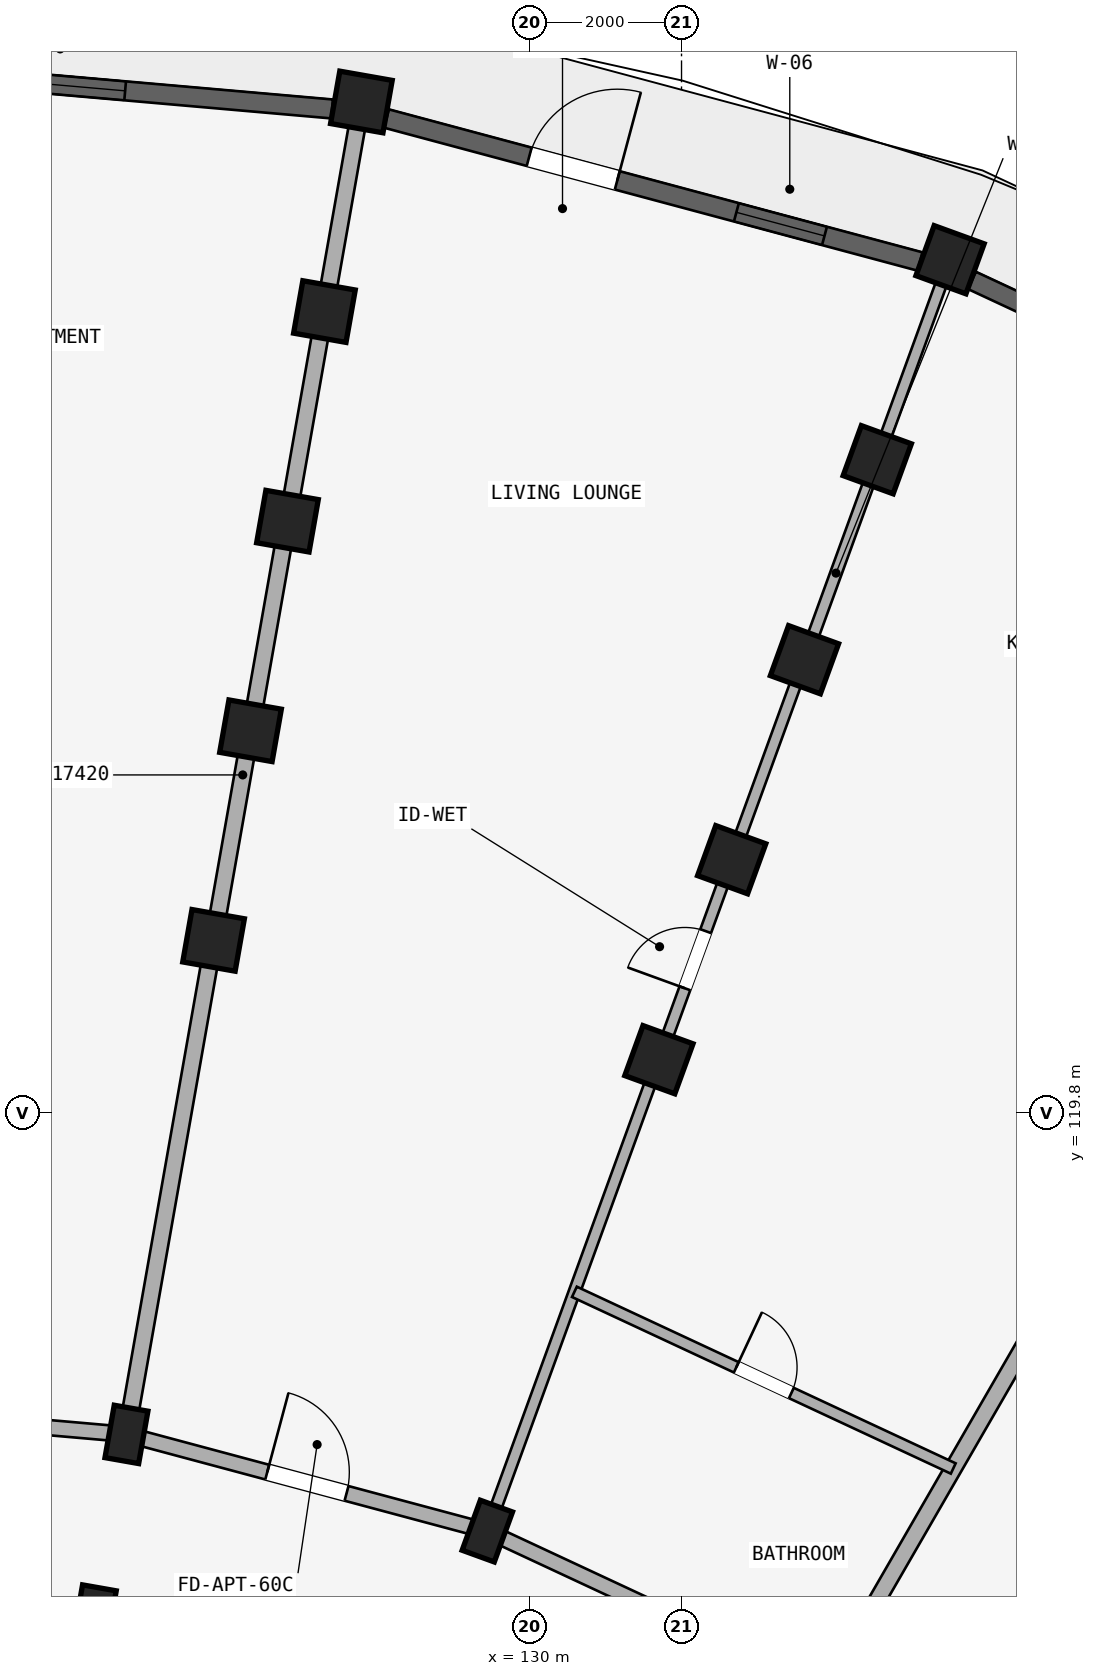
"""IFC4 building model, lengths in metres.
Left out: names, types, materials, properties, quantities, classifications, styles, units other than length and angle.
Written with IfcOpenShell. Run it as: python <this file> out.ifc"""

import sys

from ifc_helpers import new_model, si_unit, direction, frame, frame_2d, origin, origin_2d, place, context, subcontext, project, spatial, rectangle, extrude, element, fill, save


model = new_model("IFC4")
c1 = context("Model", 3, precision=1e-05, world=origin(), true_north=direction((0.0, 1.0)))
c2 = subcontext(c1, "Body", "Model", "MODEL_VIEW")
j1 = project(units=[si_unit("LENGTHUNIT", "METRE"), si_unit("PLANEANGLEUNIT", "RADIAN")], contexts=[c1])
p1 = place(None, origin())
s1 = spatial("IfcSite", under=j1, at=p1, CompositionType="ELEMENT")
p2 = place(p1, origin())
s2 = spatial("IfcBuilding", under=s1, at=p2, CompositionType="ELEMENT")
p3 = place(p2, frame((0.0, 0.0, 24.45)))
s3 = spatial("IfcBuildingStorey", under=s2, at=p3, CompositionType="ELEMENT", Elevation=24.45)
for number, where, z_axis, x_axis in (
    (1, (124.28, 113.208, 0.0), (0.0, 0.0, 1.0), (-0.985, 0.174, 0.0)),
    (2, (124.697, 115.572, 0.0), (0.0, 0.0, 1.0), (-0.985, 0.174, 0.0)),
):
    element("IfcColumn", number, at=place(p3, frame(where, z_axis=z_axis, x_axis=x_axis)), inside=s3, PredefinedType="COLUMN", context=c2, shape_type="SweptSolid", body=[
        extrude(rectangle(XDim=0.45, YDim=0.7, at=origin_2d()), origin(), (0.0, 0.0, 1.0), 2.93),
    ])
for number, where, z_axis, x_axis in (
    (3, (125.843, 122.071, 0.0), (0.0, 0.0, 1.0), (-0.985, 0.174, 0.0)),
    (4, (126.329, 124.829, 0.0), (0.0, 0.0, 1.0), (-0.985, 0.174, 0.0)),
    (5, (126.815, 127.586, 0.0), (0.0, 0.0, 1.0), (-0.985, 0.174, 0.0)),
    (6, (127.302, 130.344, 0.0), (0.0, 0.0, 1.0), (-0.985, 0.174, 0.0)),
    (7, (127.788, 133.101, 0.0), (0.0, 0.0, 1.0), (-0.985, 0.174, 0.0)),
):
    element("IfcColumn", number, at=place(p3, frame(where, z_axis=z_axis, x_axis=x_axis)), inside=s3, PredefinedType="COLUMN", context=c2, shape_type="SweptSolid", body=[
        extrude(rectangle(XDim=0.7, YDim=0.7, at=origin_2d()), origin(), (0.0, 0.0, 1.0), 2.93),
    ])
p4 = place(p3, frame((129.445, 114.299, 0.0), z_axis=(0.0, 0.0, 1.0), x_axis=(-0.939692620786, 0.342020143326, 0.0)))
e8 = element("IfcColumn", 8, at=p4, inside=s3, PredefinedType="COLUMN", context=c2, shape_type="SweptSolid", body=[
    extrude(rectangle(XDim=0.45, YDim=0.7, at=origin_2d()), origin(), (0.0, 0.0, 1.0), 2.93),
])
for number, where, z_axis, x_axis in (
    (9, (131.702, 120.501, 0.0), (0.0, 0.0, 1.0), (-0.94, 0.342, 0.0)),
    (10, (132.66, 123.132, 0.0), (0.0, 0.0, 1.0), (-0.94, 0.342, 0.0)),
    (11, (133.618, 125.764, 0.0), (0.0, 0.0, 1.0), (-0.94, 0.342, 0.0)),
    (12, (134.575, 128.395, 0.0), (0.0, 0.0, 1.0), (-0.94, 0.342, 0.0)),
    (13, (135.533, 131.026, 0.0), (0.0, 0.0, 1.0), (-0.94, 0.342, 0.0)),
):
    element("IfcColumn", number, at=place(p3, frame(where, z_axis=z_axis, x_axis=x_axis)), inside=s3, PredefinedType="COLUMN", context=c2, shape_type="SweptSolid", body=[
        extrude(rectangle(XDim=0.7, YDim=0.7, at=origin_2d()), origin(), (0.0, 0.0, 1.0), 2.93),
    ])
p5 = place(p3, frame((119.8, 113.6, 0.0), z_axis=(0.0, 0.0, 1.0), x_axis=(0.996191949488, -0.087187153726, 0.0)))
e14 = element("IfcWall", 14, at=p5, inside=s3, PredefinedType="STANDARD", context=c2, shape_type="SweptSolid", body=[
    extrude(rectangle(XDim=4.497, YDim=0.2, at=frame_2d((2.249, 0.0))), origin(), (0.0, 0.0, 1.0), 2.372),
])
p6 = place(p5, frame((1.729, 0.0, 0.0)))
e15 = element("IfcOpeningElement", 15, at=p6, cuts=e14, PredefinedType="OPENING", context=c2, shape_type="SweptSolid", body=[
    extrude(rectangle(XDim=1.04, YDim=2.15, at=frame_2d((0.52, 1.075))), frame((0.0, 0.11, 0.0), z_axis=(0.0, -1.0, 0.0), x_axis=(1.0, 0.0, 0.0)), (0.0, 0.0, 1.0), 0.22),
])
p7 = place(p3, frame((119.8, 116.0, 0.0), z_axis=(0.0, 0.0, 1.0), x_axis=(0.996193663584, -0.087167566415, 0.0)))
e16 = element("IfcWall", 16, at=p7, inside=s3, PredefinedType="STANDARD", context=c2, shape_type="SweptSolid", body=[
    extrude(rectangle(XDim=4.916, YDim=0.2, at=frame_2d((2.458, 0.0))), origin(), (0.0, 0.0, 1.0), 2.372),
])
p8 = place(p7, frame((1.938, 0.0, 0.0)))
e17 = element("IfcOpeningElement", 17, at=p8, cuts=e16, PredefinedType="OPENING", context=c2, shape_type="SweptSolid", body=[
    extrude(rectangle(XDim=1.04, YDim=2.15, at=frame_2d((0.52, 1.075))), frame((0.0, 0.11, 0.0), z_axis=(0.0, -1.0, 0.0), x_axis=(1.0, 0.0, 0.0)), (0.0, 0.0, 1.0), 0.22),
])
p9 = place(p3, frame((124.697, 115.572, 0.0), z_axis=(0.0, 0.0, 1.0), x_axis=(0.965930095386, -0.258803112091, 0.0)))
e18 = element("IfcWall", 18, at=p9, inside=s3, PredefinedType="STANDARD", context=c2, shape_type="SweptSolid", body=[
    extrude(rectangle(XDim=4.916, YDim=0.2, at=frame_2d((2.458, 0.0))), origin(), (0.0, 0.0, 1.0), 2.372),
])
p10 = place(p9, frame((1.918, 0.0, 0.0)))
e19 = element("IfcOpeningElement", 19, at=p10, cuts=e18, PredefinedType="OPENING", context=c2, shape_type="SweptSolid", body=[
    extrude(rectangle(XDim=1.08, YDim=2.15, at=frame_2d((0.54, 1.075))), frame((0.0, 0.11, 0.0), z_axis=(0.0, -1.0, 0.0), x_axis=(1.0, 0.0, 0.0)), (0.0, 0.0, 1.0), 0.22),
])
p11 = place(p3, frame((129.445, 114.299, 0.0), z_axis=(0.0, 0.0, 1.0), x_axis=(0.906302381024, -0.422629854778, 0.0)))
e20 = element("IfcWall", 20, at=p11, inside=s3, PredefinedType="STANDARD", context=c2, shape_type="SweptSolid", body=[
    extrude(rectangle(XDim=4.915, YDim=0.2, at=frame_2d((2.458, 0.0))), origin(), (0.0, 0.0, 1.0), 2.372),
])
p12 = place(p3, frame((124.714, 115.67, 0.0), z_axis=(0.0, 0.0, 1.0), x_axis=(0.173646216546, 0.984808098809, 0.0)))
e21 = element("IfcWall", 21, at=p12, inside=s3, PredefinedType="STANDARD", context=c2, shape_type="SweptSolid", body=[
    extrude(rectangle(XDim=17.42, YDim=0.22, at=frame_2d((8.71, 0.0))), origin(), (0.0, 0.0, 1.0), 2.372),
])
p13 = place(p3, frame((129.479, 114.393, 0.0), z_axis=(0.0, 0.0, 1.0), x_axis=(0.342022120477, 0.939691901159, 0.0)))
e22 = element("IfcWall", 22, at=p13, inside=s3, PredefinedType="PARTITIONING", context=c2, shape_type="SweptSolid", body=[
    extrude(rectangle(XDim=17.42, YDim=0.15, at=frame_2d((8.71, 0.0))), origin(), (0.0, 0.0, 1.0), 2.372),
])
p14 = place(p13, frame((7.5, 0.0, 0.0)))
e23 = element("IfcOpeningElement", 23, at=p14, cuts=e22, PredefinedType="OPENING", context=c2, shape_type="SweptSolid", body=[
    extrude(rectangle(XDim=0.8, YDim=2.1, at=frame_2d((0.4, 1.05))), frame((0.0, 0.085, 0.0), z_axis=(0.0, -1.0, 0.0), x_axis=(1.0, 0.0, 0.0)), (0.0, 0.0, 1.0), 0.17),
])
p15 = place(p3, frame((133.95, 112.309, 0.0), z_axis=(0.0, 0.0, 1.0), x_axis=(0.499997843263, 0.866026648973, 0.0)))
e24 = element("IfcWall", 24, at=p15, inside=s3, PredefinedType="STANDARD", context=c2, shape_type="SweptSolid", body=[
    extrude(rectangle(XDim=17.42, YDim=0.22, at=frame_2d((8.71, 0.0))), origin(), (0.0, 0.0, 1.0), 2.372),
])
p16 = place(p3, frame((130.591, 117.447, 0.0), z_axis=(0.0, 0.0, 1.0), x_axis=(0.906302189986, -0.422630264446, 0.0)))
e25 = element("IfcWall", 25, at=p16, inside=s3, PredefinedType="PLUMBINGWALL", context=c2, shape_type="SweptSolid", body=[
    extrude(rectangle(XDim=5.5, YDim=0.15, at=frame_2d((2.75, 0.0))), origin(), (0.0, 0.0, 1.0), 2.372),
])
p17 = place(p16, frame((2.35, 0.0, 0.0)))
e26 = element("IfcOpeningElement", 26, at=p17, cuts=e25, PredefinedType="OPENING", context=c2, shape_type="SweptSolid", body=[
    extrude(rectangle(XDim=0.8, YDim=2.1, at=frame_2d((0.4, 1.05))), frame((0.0, 0.085, 0.0), z_axis=(0.0, -1.0, 0.0), x_axis=(1.0, 0.0, 0.0)), (0.0, 0.0, 1.0), 0.17),
])
p18 = place(p3, frame((120.164, 133.643, 0.0), z_axis=(0.0, 0.0, 1.0), x_axis=(0.99619214922, -0.08718487158, 0.0)))
e27 = element("IfcWall", 27, at=p18, inside=s3, PredefinedType="STANDARD", context=c2, shape_type="SweptSolid", body=[
    extrude(rectangle(XDim=7.267, YDim=0.25, at=frame_2d((3.633, 0.0))), origin(), (0.0, 0.0, 1.0), 2.372),
])
p19 = place(p18, frame((2.733, 0.0, 0.522)))
e28 = element("IfcOpeningElement", 28, at=p19, cuts=e27, PredefinedType="OPENING", context=c2, shape_type="SweptSolid", body=[
    extrude(rectangle(XDim=1.8, YDim=1.65, at=frame_2d((0.9, 0.825))), frame((0.0, 0.135, 0.0), z_axis=(0.0, -1.0, 0.0), x_axis=(1.0, 0.0, 0.0)), (0.0, 0.0, 1.0), 0.27),
])
p20 = place(p3, frame((128.118, 132.883, 0.0), z_axis=(0.0, 0.0, 1.0), x_axis=(0.965930355787, -0.258802140196, 0.0)))
e29 = element("IfcWall", 29, at=p20, inside=s3, PredefinedType="STANDARD", context=c2, shape_type="SweptSolid", body=[
    extrude(rectangle(XDim=7.267, YDim=0.25, at=frame_2d((3.633, 0.0))), origin(), (0.0, 0.0, 1.0), 2.372),
])
p21 = place(p20, frame((4.766, 0.0, 0.422)))
e30 = element("IfcOpeningElement", 30, at=p21, cuts=e29, PredefinedType="OPENING", context=c2, shape_type="SweptSolid", body=[
    extrude(rectangle(XDim=1.2, YDim=1.5, at=frame_2d((0.6, 0.75))), frame((0.0, 0.135, 0.0), z_axis=(0.0, -1.0, 0.0), x_axis=(1.0, 0.0, 0.0)), (0.0, 0.0, 1.0), 0.27),
])
p22 = place(p20, frame((1.943, 0.0, 0.0)))
e31 = element("IfcOpeningElement", 31, at=p22, cuts=e29, PredefinedType="OPENING", context=c2, shape_type="SweptSolid", body=[
    extrude(rectangle(XDim=1.2, YDim=2.15, at=frame_2d((0.6, 1.075))), frame((0.0, 0.135, 0.0), z_axis=(0.0, -1.0, 0.0), x_axis=(1.0, 0.0, 0.0)), (0.0, 0.0, 1.0), 0.27),
])
p23 = place(p3, frame((135.821, 130.754, 0.0), z_axis=(0.0, 0.0, 1.0), x_axis=(0.90630327107, -0.422627946127, 0.0)))
e32 = element("IfcWall", 32, at=p23, inside=s3, PredefinedType="STANDARD", context=c2, shape_type="SweptSolid", body=[
    extrude(rectangle(XDim=7.267, YDim=0.25, at=frame_2d((3.633, 0.0))), origin(), (0.0, 0.0, 1.0), 2.372),
])
p24 = place(p23, frame((2.733, 0.0, 0.522)))
e33 = element("IfcOpeningElement", 33, at=p24, cuts=e32, PredefinedType="OPENING", context=c2, shape_type="SweptSolid", body=[
    extrude(rectangle(XDim=1.8, YDim=1.65, at=frame_2d((0.9, 0.825))), frame((0.0, 0.135, 0.0), z_axis=(0.0, -1.0, 0.0), x_axis=(1.0, 0.0, 0.0)), (0.0, 0.0, 1.0), 0.27),
])
p25 = place(p19, origin())
e34 = element("IfcWindow", 34, at=p25, inside=s3, PartitioningType="DOUBLE_PANEL_VERTICAL", PredefinedType="WINDOW", context=c2, shape_type="SweptSolid", body=[
    extrude(rectangle(XDim=1.8, YDim=1.65, at=frame_2d((0.9, 0.825))), frame((0.0, 0.03, 0.0), z_axis=(0.0, -1.0, 0.0), x_axis=(1.0, 0.0, 0.0)), (0.0, 0.0, 1.0), 0.06),
])
fill(e28, e34)
p26 = place(p21, origin())
e35 = element("IfcWindow", 35, at=p26, inside=s3, PartitioningType="SINGLE_PANEL", PredefinedType="WINDOW", context=c2, shape_type="SweptSolid", body=[
    extrude(rectangle(XDim=1.2, YDim=1.5, at=frame_2d((0.6, 0.75))), frame((0.0, 0.03, 0.0), z_axis=(0.0, -1.0, 0.0), x_axis=(1.0, 0.0, 0.0)), (0.0, 0.0, 1.0), 0.06),
])
fill(e30, e35)
p27 = place(p14, frame((0.8, 0.0, 0.0), z_axis=(0.0, 0.0, 1.0), x_axis=(-1.0, 0.0, 0.0)))
e36 = element("IfcDoor", 36, at=p27, inside=s3, OperationType="SINGLE_SWING_RIGHT", PredefinedType="DOOR", context=c2, shape_type="SweptSolid", body=[
    extrude(rectangle(XDim=0.8, YDim=2.1, at=frame_2d((0.4, 1.05))), frame((0.0, 0.025, 0.0), z_axis=(0.0, -1.0, 0.0), x_axis=(1.0, 0.0, 0.0)), (0.0, 0.0, 1.0), 0.05),
])
fill(e23, e36)
p28 = place(p10, frame((1.08, 0.0, 0.0), z_axis=(0.0, 0.0, 1.0), x_axis=(-1.0, 0.0, 0.0)))
e37 = element("IfcDoor", 37, at=p28, inside=s3, OperationType="SINGLE_SWING_RIGHT", PredefinedType="DOOR", context=c2, shape_type="SweptSolid", body=[
    extrude(rectangle(XDim=1.08, YDim=2.15, at=frame_2d((0.54, 1.075))), frame((0.0, 0.025, 0.0), z_axis=(0.0, -1.0, 0.0), x_axis=(1.0, 0.0, 0.0)), (0.0, 0.0, 1.0), 0.05),
])
fill(e19, e37)
p29 = place(p17, origin())
e38 = element("IfcDoor", 38, at=p29, inside=s3, OperationType="SINGLE_SWING_LEFT", PredefinedType="DOOR", context=c2, shape_type="SweptSolid", body=[
    extrude(rectangle(XDim=0.8, YDim=2.1, at=frame_2d((0.4, 1.05))), frame((0.0, 0.025, 0.0), z_axis=(0.0, -1.0, 0.0), x_axis=(1.0, 0.0, 0.0)), (0.0, 0.0, 1.0), 0.05),
])
fill(e26, e38)
p30 = place(p22, origin())
e39 = element("IfcDoor", 39, at=p30, inside=s3, OperationType="SINGLE_SWING_RIGHT", PredefinedType="DOOR", context=c2, shape_type="SweptSolid", body=[
    extrude(rectangle(XDim=1.2, YDim=2.15, at=frame_2d((0.6, 1.075))), frame((0.0, 0.025, 0.0), z_axis=(0.0, -1.0, 0.0), x_axis=(1.0, 0.0, 0.0)), (0.0, 0.0, 1.0), 0.05),
])
fill(e31, e39)
save(model, sys.argv[1])
